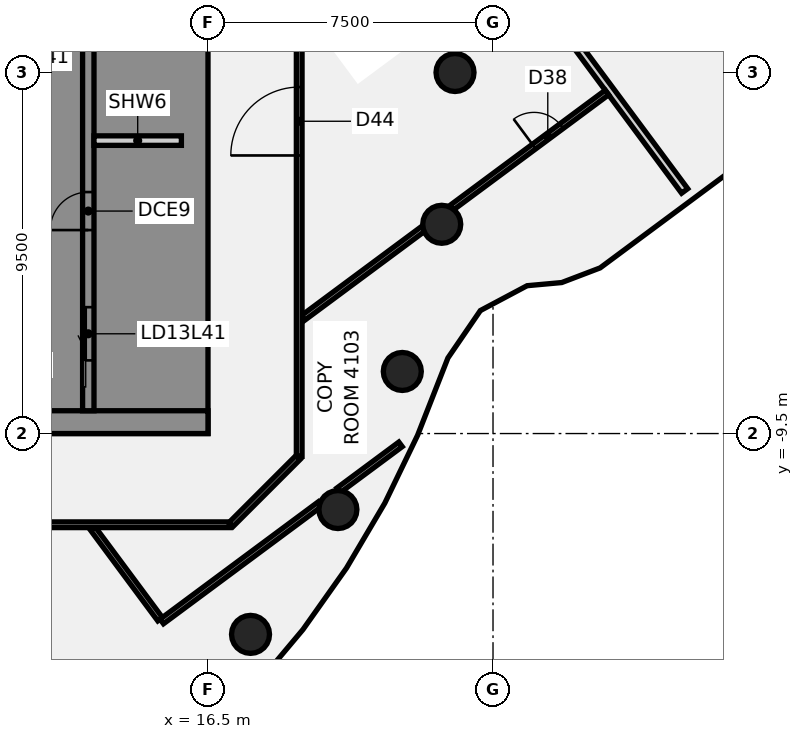
"""IFC4 building model, lengths in metres.
Left out: names, types, materials, properties, quantities, classifications, styles, units other than length and angle.
Written with IfcOpenShell. Run it as: python <this file> out.ifc"""

import sys

from ifc_helpers import new_model, si_unit, direction, frame, frame_2d, origin, origin_2d, place, context, subcontext, project, spatial, polyline, rectangle, circle, outline, extrude, element, fill, save


model = new_model("IFC4")
c1 = context("Model", 3, precision=1e-05, world=origin(), true_north=direction((0.0, 1.0)))
c2 = subcontext(c1, "Body", "Model", "MODEL_VIEW")
j1 = project(units=[si_unit("LENGTHUNIT", "METRE"), si_unit("PLANEANGLEUNIT", "RADIAN")], contexts=[c1])
p1 = place(None, origin())
s1 = spatial("IfcSite", under=j1, at=p1, CompositionType="ELEMENT")
p2 = place(p1, origin())
s2 = spatial("IfcBuilding", under=s1, at=p2, CompositionType="ELEMENT")
p3 = place(p2, frame((0.0, 0.0, 166.75)))
s3 = spatial("IfcBuildingStorey", under=s2, at=p3, CompositionType="ELEMENT", Elevation=166.75)
for number, where, z_axis, x_axis in (
    (1, (23.0, 0.0, -0.14), (0.0, 0.0, 1.0), (1.0, 0.0, 0.0)),
    (2, (17.619, -14.784, -0.14), (0.0, 0.0, 1.0), (1.0, 0.0, 0.0)),
    (3, (19.919, -11.5, -0.14), (0.0, 0.0, 1.0), (1.0, 0.0, 0.0)),
    (4, (21.613, -7.866, -0.14), (0.0, 0.0, 1.0), (1.0, 0.0, 0.0)),
    (5, (22.651, -3.994, -0.14), (0.0, 0.0, 1.0), (1.0, 0.0, 0.0)),
):
    element("IfcColumn", number, at=place(p3, frame(where, z_axis=z_axis, x_axis=x_axis)), inside=s3, PredefinedType="COLUMN", context=c2, shape_type="SweptSolid", body=[
        extrude(circle(Radius=0.5, at=origin_2d()), origin(), (0.0, 0.0, 1.0), 3.75),
    ])
p4 = place(p3, frame((13.47, -12.0, 0.0), z_axis=(0.0, 0.0, 1.0), x_axis=(0.595807571088, -0.803127224189, 0.0)))
e6 = element("IfcWall", 6, at=p4, inside=s3, PredefinedType="PARTITIONING", context=c2, shape_type="SweptSolid", body=[
    extrude(rectangle(XDim=2.969, YDim=0.15, at=frame_2d((1.484, 0.0))), origin(), (0.0, 0.0, 1.0), 3.01),
])
p5 = place(p3, frame((20.572, 8.304, 0.0), z_axis=(0.0, 0.0, 1.0), x_axis=(0.595763686941, -0.803159778202, 0.0)))
e7 = element("IfcWall", 7, at=p5, inside=s3, PredefinedType="PARTITIONING", context=c2, shape_type="SweptSolid", body=[
    extrude(rectangle(XDim=14.219, YDim=0.2, at=frame_2d((7.109, 0.0))), origin(), (0.0, 0.0, 1.0), 3.01),
])
p6 = place(p5, frame((6.62, 0.0, 0.0)))
e8 = element("IfcOpeningElement", 8, at=p6, cuts=e7, PredefinedType="OPENING", context=c2, shape_type="SweptSolid", body=[
    extrude(rectangle(XDim=1.4, YDim=2.1, at=frame_2d((0.7, 1.05))), frame((0.0, 0.11, 0.0), z_axis=(0.0, -1.0, 0.0), x_axis=(1.0, 0.0, 0.0)), (0.0, 0.0, 1.0), 0.22),
])
p7 = place(p3, frame((-17.1, -11.9, 0.0), z_axis=(0.0, 0.0, 1.0), x_axis=(1.0, 0.0, 0.0)))
e9 = element("IfcWall", 9, at=p7, inside=s3, PredefinedType="PARTITIONING", context=c2, shape_type="SweptSolid", body=[
    extrude(rectangle(XDim=34.165, YDim=0.15, at=frame_2d((17.083, 0.0))), origin(), (0.0, 0.0, 1.0), 3.01),
])
p8 = place(p7, frame((9.617, 0.0, 0.0)))
e10 = element("IfcOpeningElement", 10, at=p8, cuts=e9, PredefinedType="OPENING", context=c2, shape_type="SweptSolid", body=[
    extrude(rectangle(XDim=1.8, YDim=2.1, at=frame_2d((0.9, 1.05))), frame((0.0, 0.085, 0.0), z_axis=(0.0, -1.0, 0.0), x_axis=(1.0, 0.0, 0.0)), (0.0, 0.0, 1.0), 0.17),
])
p9 = place(p7, frame((1.95, 0.0, 0.0)))
e11 = element("IfcOpeningElement", 11, at=p9, cuts=e9, PredefinedType="OPENING", context=c2, shape_type="SweptSolid", body=[
    extrude(rectangle(XDim=1.8, YDim=2.1, at=frame_2d((0.9, 1.05))), frame((0.0, 0.085, 0.0), z_axis=(0.0, -1.0, 0.0), x_axis=(1.0, 0.0, 0.0)), (0.0, 0.0, 1.0), 0.17),
])
p10 = place(p7, frame((23.871, 0.0, 0.0)))
e12 = element("IfcOpeningElement", 12, at=p10, cuts=e9, PredefinedType="OPENING", context=c2, shape_type="SweptSolid", body=[
    extrude(rectangle(XDim=1.8, YDim=2.1, at=frame_2d((0.9, 1.05))), frame((0.0, 0.085, 0.0), z_axis=(0.0, -1.0, 0.0), x_axis=(1.0, 0.0, 0.0)), (0.0, 0.0, 1.0), 0.17),
])
p11 = place(p3, frame((15.284, -14.445, 0.0), z_axis=(0.0, 0.0, 1.0), x_axis=(0.803131470392, 0.595801847317, 0.0)))
e13 = element("IfcWall", 13, at=p11, inside=s3, PredefinedType="PARTITIONING", context=c2, shape_type="SweptSolid", body=[
    extrude(rectangle(XDim=5.184, YDim=0.15, at=frame_2d((2.592, 0.0))), origin(), (0.0, 0.0, 1.0), 3.01),
])
p12 = place(p3, frame((19.935, -10.994, 0.0), z_axis=(0.0, 0.0, 1.0), x_axis=(0.803148127908, 0.595779392593, 0.0)))
e14 = element("IfcWall", 14, at=p12, inside=s3, PredefinedType="PARTITIONING", context=c2, shape_type="SweptSolid", body=[
    extrude(rectangle(XDim=2.031, YDim=0.15, at=frame_2d((1.016, 0.0))), origin(), (0.0, 0.0, 1.0), 3.01),
])
p13 = place(p3, frame((19.0, -6.458, 0.0), z_axis=(0.0, 0.0, 1.0), x_axis=(0.803180127116, 0.595736253225, 0.0)))
e15 = element("IfcWall", 15, at=p13, inside=s3, PredefinedType="PARTITIONING", context=c2, shape_type="SweptSolid", body=[
    extrude(rectangle(XDim=3.947, YDim=0.15, at=frame_2d((1.974, 0.0))), origin(), (0.0, 0.0, 1.0), 3.01),
])
p14 = place(p3, frame((22.911, -3.558, 0.0), z_axis=(0.0, 0.0, 1.0), x_axis=(0.803172828939, 0.595746092605, 0.0)))
e16 = element("IfcWall", 16, at=p14, inside=s3, PredefinedType="PARTITIONING", context=c2, shape_type="SweptSolid", body=[
    extrude(rectangle(XDim=5.088, YDim=0.15, at=frame_2d((2.544, 0.0))), origin(), (0.0, 0.0, 1.0), 3.01),
])
p15 = place(p14, frame((2.7, 0.0, 0.0)))
e17 = element("IfcOpeningElement", 17, at=p15, cuts=e16, PredefinedType="OPENING", context=c2, shape_type="SweptSolid", body=[
    extrude(rectangle(XDim=0.9, YDim=2.1, at=frame_2d((0.45, 1.05))), frame((0.0, 0.085, 0.0), z_axis=(0.0, -1.0, 0.0), x_axis=(1.0, 0.0, 0.0)), (0.0, 0.0, 1.0), 0.17),
])
p16 = place(p3, frame((17.1, -11.9, 0.0), z_axis=(0.0, 0.0, 1.0), x_axis=(0.707106781187, 0.707106781187, 0.0)))
e18 = element("IfcWall", 18, at=p16, inside=s3, PredefinedType="PARTITIONING", context=c2, shape_type="SweptSolid", body=[
    extrude(rectangle(XDim=2.505, YDim=0.15, at=frame_2d((1.253, 0.0))), origin(), (0.0, 0.0, 1.0), 3.01),
])
p17 = place(p3, frame((18.9, -10.1, 0.0), z_axis=(0.0, 0.0, 1.0), x_axis=(0.0, 1.0, 0.0)))
e19 = element("IfcWall", 19, at=p17, inside=s3, PredefinedType="PARTITIONING", context=c2, shape_type="SweptSolid", body=[
    extrude(rectangle(XDim=20.2, YDim=0.15, at=frame_2d((10.1, 0.0))), origin(), (0.0, 0.0, 1.0), 3.01),
])
p18 = place(p17, frame((7.917, 0.0, 0.0)))
e20 = element("IfcOpeningElement", 20, at=p18, cuts=e19, PredefinedType="OPENING", context=c2, shape_type="SweptSolid", body=[
    extrude(rectangle(XDim=1.8, YDim=2.1, at=frame_2d((0.9, 1.05))), frame((0.0, 0.085, 0.0), z_axis=(0.0, -1.0, 0.0), x_axis=(1.0, 0.0, 0.0)), (0.0, 0.0, 1.0), 0.17),
])
p19 = place(p17, frame((13.534, 0.0, 0.0)))
e21 = element("IfcOpeningElement", 21, at=p19, cuts=e19, PredefinedType="OPENING", context=c2, shape_type="SweptSolid", body=[
    extrude(rectangle(XDim=0.9, YDim=2.1, at=frame_2d((0.45, 1.05))), frame((0.0, 0.085, 0.0), z_axis=(0.0, -1.0, 0.0), x_axis=(1.0, 0.0, 0.0)), (0.0, 0.0, 1.0), 0.17),
])
p20 = place(p3, frame((16.5, -9.2, 0.0), z_axis=(0.0, 0.0, 1.0), x_axis=(-1.0, 0.0, 0.0)))
e22 = element("IfcWall", 22, at=p20, inside=s3, PredefinedType="SHEAR", context=c2, shape_type="SweptSolid", body=[
    extrude(rectangle(XDim=13.0, YDim=0.6, at=frame_2d((6.5, 0.0))), origin(), (0.0, 0.0, 1.0), 3.61),
])
p21 = place(p20, frame((4.15, 0.0, 0.0)))
e23 = element("IfcOpeningElement", 23, at=p21, cuts=e22, PredefinedType="OPENING", context=c2, shape_type="SweptSolid", body=[
    extrude(rectangle(XDim=1.4, YDim=2.1, at=frame_2d((0.7, 1.05))), frame((0.0, 0.31, 0.0), z_axis=(0.0, -1.0, 0.0), x_axis=(1.0, 0.0, 0.0)), (0.0, 0.0, 1.0), 0.62),
])
p22 = place(p20, frame((10.125, 0.0, 0.0)))
e24 = element("IfcOpeningElement", 24, at=p22, cuts=e22, PredefinedType="OPENING", context=c2, shape_type="SweptSolid", body=[
    extrude(rectangle(XDim=1.4, YDim=2.1, at=frame_2d((0.7, 1.05))), frame((0.0, 0.31, 0.0), z_axis=(0.0, -1.0, 0.0), x_axis=(1.0, 0.0, 0.0)), (0.0, 0.0, 1.0), 0.62),
])
p23 = place(p3, origin())
e25 = element("IfcWall", 25, at=p23, inside=s3, PredefinedType="SHEAR", context=c2, shape_type="SweptSolid", body=[
    extrude(outline(polyline([(13.5, -8.125), (13.5, -8.9), (15.9, -8.9), (16.5, -8.9), (16.5, 8.9), (15.9, 8.9), (13.5, 8.9), (13.5, 8.125), (15.9, 8.125), (15.9, 5.625), (13.5, 5.625), (13.5, 5.375), (15.9, 5.375), (15.9, -5.375), (13.5, -5.375), (13.5, -5.625), (15.9, -5.625), (15.9, -8.125), (13.5, -8.125)])), origin(), (0.0, 0.0, 1.0), 3.61),
])
p24 = place(p3, frame((13.35, -8.9, 0.0), z_axis=(0.0, 0.0, 1.0), x_axis=(0.0, 1.0, 0.0)))
e26 = element("IfcWall", 26, at=p24, inside=s3, PredefinedType="SHEAR", context=c2, shape_type="SweptSolid", body=[
    extrude(rectangle(XDim=17.8, YDim=0.3, at=frame_2d((8.9, 0.0))), origin(), (0.0, 0.0, 1.0), 3.61),
])
p25 = place(p24, frame((1.325, 0.0, 0.0)))
e27 = element("IfcOpeningElement", 27, at=p25, cuts=e26, PredefinedType="OPENING", context=c2, shape_type="SweptSolid", body=[
    extrude(rectangle(XDim=1.4, YDim=2.1, at=frame_2d((0.7, 1.05))), frame((0.0, 0.16, 0.0), z_axis=(0.0, -1.0, 0.0), x_axis=(1.0, 0.0, 0.0)), (0.0, 0.0, 1.0), 0.32),
])
p26 = place(p24, frame((4.754, 0.0, 0.0)))
e28 = element("IfcOpeningElement", 28, at=p26, cuts=e26, PredefinedType="OPENING", context=c2, shape_type="SweptSolid", body=[
    extrude(rectangle(XDim=1.0, YDim=2.1, at=frame_2d((0.5, 1.05))), frame((0.0, 0.16, 0.0), z_axis=(0.0, -1.0, 0.0), x_axis=(1.0, 0.0, 0.0)), (0.0, 0.0, 1.0), 0.32),
])
p27 = place(p24, frame((10.254, 0.0, 0.0)))
e29 = element("IfcOpeningElement", 29, at=p27, cuts=e26, PredefinedType="OPENING", context=c2, shape_type="SweptSolid", body=[
    extrude(rectangle(XDim=1.0, YDim=2.1, at=frame_2d((0.5, 1.05))), frame((0.0, 0.16, 0.0), z_axis=(0.0, -1.0, 0.0), x_axis=(1.0, 0.0, 0.0)), (0.0, 0.0, 1.0), 0.32),
])
p28 = place(p3, frame((15.8, -1.792, 0.0), z_axis=(0.0, 0.0, 1.0), x_axis=(-1.0, 0.0, 0.0)))
e30 = element("IfcWall", 30, at=p28, inside=s3, PredefinedType="PARTITIONING", context=c2, shape_type="SweptSolid", body=[
    extrude(rectangle(XDim=2.3, YDim=0.25, at=frame_2d((1.15, 0.0))), origin(), (0.0, 0.0, 1.0), 3.61),
])
p29 = place(p15, frame((0.9, 0.0, 0.0), z_axis=(0.0, 0.0, 1.0), x_axis=(-1.0, 0.0, 0.0)))
e31 = element("IfcDoor", 31, at=p29, inside=s3, OperationType="SINGLE_SWING_RIGHT", PredefinedType="DOOR", context=c2, shape_type="SweptSolid", body=[
    extrude(rectangle(XDim=0.9, YDim=2.1, at=frame_2d((0.45, 1.05))), frame((0.0, 0.025, 0.0), z_axis=(0.0, -1.0, 0.0), x_axis=(1.0, 0.0, 0.0)), (0.0, 0.0, 1.0), 0.05),
])
fill(e17, e31)
p30 = place(p18, origin())
e32 = element("IfcDoor", 32, at=p30, inside=s3, OperationType="DOUBLE_DOOR_SINGLE_SWING", PredefinedType="DOOR", context=c2, shape_type="SweptSolid", body=[
    extrude(rectangle(XDim=1.8, YDim=2.1, at=frame_2d((0.9, 1.05))), frame((0.0, 0.025, 0.0), z_axis=(0.0, -1.0, 0.0), x_axis=(1.0, 0.0, 0.0)), (0.0, 0.0, 1.0), 0.05),
])
fill(e20, e32)
p31 = place(p25, origin())
e33 = element("IfcDoor", 33, at=p31, inside=s3, OperationType="SLIDING_TO_LEFT", PredefinedType="DOOR", context=c2, shape_type="SweptSolid", body=[
    extrude(rectangle(XDim=1.4, YDim=2.1, at=frame_2d((0.7, 1.05))), frame((0.0, 0.025, 0.0), z_axis=(0.0, -1.0, 0.0), x_axis=(1.0, 0.0, 0.0)), (0.0, 0.0, 1.0), 0.05),
])
fill(e27, e33)
p32 = place(p26, origin())
e34 = element("IfcDoor", 34, at=p32, inside=s3, OperationType="SINGLE_SWING_LEFT", PredefinedType="DOOR", context=c2, shape_type="SweptSolid", body=[
    extrude(rectangle(XDim=1.0, YDim=2.1, at=frame_2d((0.5, 1.05))), frame((0.0, 0.025, 0.0), z_axis=(0.0, -1.0, 0.0), x_axis=(1.0, 0.0, 0.0)), (0.0, 0.0, 1.0), 0.05),
])
fill(e28, e34)
save(model, sys.argv[1])
